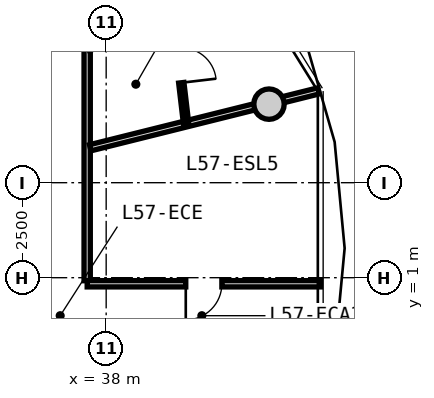
"""IFC4 building model, lengths in metres.
Left out: names, types, materials, properties, quantities, classifications, styles, units other than length and angle.
Written with IfcOpenShell. Run it as: python <this file> out.ifc"""

import sys

from ifc_helpers import new_model, si_unit, direction, frame, frame_2d, origin, origin_2d, place, context, subcontext, project, spatial, rectangle, circle, extrude, source, transform, mapped, element, fill, save


model = new_model("IFC4")
c1 = context("Model", 3, precision=1e-05, world=origin(), true_north=direction((0.0, 1.0)))
c2 = subcontext(c1, "Body", "Model", "MODEL_VIEW")
j1 = project(units=[si_unit("LENGTHUNIT", "METRE"), si_unit("PLANEANGLEUNIT", "RADIAN")], contexts=[c1])
p1 = place(None, origin())
s1 = spatial("IfcSite", under=j1, at=p1, CompositionType="ELEMENT")
p2 = place(p1, origin())
s2 = spatial("IfcBuilding", under=s1, at=p2, CompositionType="ELEMENT")
p3 = place(p2, frame((0.0, 0.0, 183.1)))
s3 = spatial("IfcBuildingStorey", under=s2, at=p3, CompositionType="ELEMENT", Elevation=183.1)
m1 = source(origin(), c2, "Body", "SweptSolid", [
    extrude(circle(Radius=0.4, at=origin_2d()), origin(), (0.0, 0.0, 1.0), 3.05),
])
p4 = place(p3, frame((42.285, 5.567, 0.0), z_axis=(0.0, 0.0, 1.0), x_axis=(1.0, 0.0, 0.0)))
e1 = element("IfcColumn", 1, at=p4, inside=s3, PredefinedType="COLUMN", context=c2, shape_type="MappedRepresentation", body=[
    mapped(m1, transform((0.0, 0.0, 0.0), x_axis=(1.0, 0.0, 0.0), y_axis=(0.0, 1.0, 0.0), z_axis=(0.0, 0.0, 1.0), scale=1.0)),
])
m2 = source(origin(), c2, "Body", "SweptSolid", [
    extrude(rectangle(XDim=6.88, YDim=0.165, at=frame_2d((3.44, 0.0))), origin(), (0.0, 0.0, 1.0), 2.715),
])
p5 = place(p3, frame((37.5, 7.8, 0.0), z_axis=(0.0, 0.0, 1.0), x_axis=(0.0, -1.0, 0.0)))
e2 = element("IfcWall", 2, at=p5, inside=s3, PredefinedType="PARTITIONING", context=c2, shape_type="MappedRepresentation", body=[
    mapped(m2, transform((0.0, 0.0, 0.0), x_axis=(1.0, 0.0, 0.0), y_axis=(0.0, 1.0, 0.0), z_axis=(0.0, 0.0, 1.0), scale=1.0)),
])
m3 = source(origin(), c2, "Body", "SweptSolid", [
    extrude(rectangle(XDim=6.193, YDim=0.165, at=frame_2d((3.096, 0.0))), origin(), (0.0, 0.0, 1.0), 2.265),
])
p6 = place(p3, frame((37.58, 4.419, 0.0), z_axis=(0.0, 0.0, 1.0), x_axis=(0.970309243466, 0.241867674657, 0.0)))
e3 = element("IfcWall", 3, at=p6, inside=s3, PredefinedType="PARTITIONING", context=c2, shape_type="MappedRepresentation", body=[
    mapped(m3, transform((0.0, 0.0, 0.0), x_axis=(1.0, 0.0, 0.0), y_axis=(0.0, 1.0, 0.0), z_axis=(0.0, 0.0, 1.0), scale=1.0)),
])
m4 = source(origin(), c2, "Body", "SweptSolid", [
    extrude(rectangle(XDim=6.139, YDim=0.165, at=frame_2d((3.069, 0.0))), origin(), (0.0, 0.0, 1.0), 2.715),
])
p7 = place(p3, frame((37.5, 0.84, 0.0), z_axis=(0.0, 0.0, 1.0), x_axis=(1.0, 0.0, 0.0)))
e4 = element("IfcWall", 4, at=p7, inside=s3, PredefinedType="PARTITIONING", context=c2, shape_type="MappedRepresentation", body=[
    mapped(m4, transform((0.0, 0.0, 0.0), x_axis=(1.0, 0.0, 0.0), y_axis=(0.0, 1.0, 0.0), z_axis=(0.0, 0.0, 1.0), scale=1.0)),
])
p8 = place(p7, frame((2.594, 0.0, 0.0)))
e5 = element("IfcOpeningElement", 5, at=p8, cuts=e4, PredefinedType="OPENING", context=c2, shape_type="SweptSolid", body=[
    extrude(rectangle(XDim=0.95, YDim=2.1, at=frame_2d((0.475, 1.05))), frame((0.0, 0.093, 0.0), z_axis=(0.0, -1.0, 0.0), x_axis=(1.0, 0.0, 0.0)), (0.0, 0.0, 1.0), 0.185),
])
m5 = source(origin(), c2, "Body", "SweptSolid", [
    extrude(rectangle(XDim=3.101, YDim=0.14, at=frame_2d((1.551, 0.0))), origin(), (0.0, 0.0, 1.0), 2.715),
])
p9 = place(p3, frame((39.742, 8.127, 0.0), z_axis=(0.0, 0.0, 1.0), x_axis=(0.116754457614, -0.993160811061, 0.0)))
e6 = element("IfcWall", 6, at=p9, inside=s3, PredefinedType="PARTITIONING", context=c2, shape_type="MappedRepresentation", body=[
    mapped(m5, transform((0.0, 0.0, 0.0), x_axis=(1.0, 0.0, 0.0), y_axis=(0.0, 1.0, 0.0), z_axis=(0.0, 0.0, 1.0), scale=1.0)),
])
p10 = place(p9, frame((1.09, 0.0, 0.0)))
e7 = element("IfcOpeningElement", 7, at=p10, cuts=e6, PredefinedType="OPENING", context=c2, shape_type="SweptSolid", body=[
    extrude(rectangle(XDim=0.92, YDim=2.1, at=frame_2d((0.46, 1.05))), frame((0.0, 0.08, 0.0), z_axis=(0.0, -1.0, 0.0), x_axis=(1.0, 0.0, 0.0)), (0.0, 0.0, 1.0), 0.16),
])
m6 = source(origin(), c2, "Body", "SweptSolid", [
    extrude(rectangle(XDim=0.95, YDim=2.1, at=frame_2d((0.475, 1.05))), frame((0.0, 0.025, 0.0), z_axis=(0.0, -1.0, 0.0), x_axis=(1.0, 0.0, 0.0)), (0.0, 0.0, 1.0), 0.05),
])
p11 = place(p8, frame((0.95, 0.0, 0.0), z_axis=(0.0, 0.0, 1.0), x_axis=(-1.0, 0.0, 0.0)))
e8 = element("IfcDoor", 8, at=p11, inside=s3, OperationType="SINGLE_SWING_RIGHT", PredefinedType="DOOR", context=c2, shape_type="MappedRepresentation", body=[
    mapped(m6, transform((0.0, 0.0, 0.0), x_axis=(1.0, 0.0, 0.0), y_axis=(0.0, 1.0, 0.0), z_axis=(0.0, 0.0, 1.0), scale=1.0)),
])
fill(e5, e8)
m7 = source(origin(), c2, "Body", "SweptSolid", [
    extrude(rectangle(XDim=0.92, YDim=2.1, at=frame_2d((0.46, 1.05))), frame((0.0, 0.025, 0.0), z_axis=(0.0, -1.0, 0.0), x_axis=(1.0, 0.0, 0.0)), (0.0, 0.0, 1.0), 0.05),
])
p12 = place(p10, origin())
e9 = element("IfcDoor", 9, at=p12, inside=s3, OperationType="SINGLE_SWING_RIGHT", PredefinedType="DOOR", context=c2, shape_type="MappedRepresentation", body=[
    mapped(m7, transform((0.0, 0.0, 0.0), x_axis=(1.0, 0.0, 0.0), y_axis=(0.0, 1.0, 0.0), z_axis=(0.0, 0.0, 1.0), scale=1.0)),
])
fill(e7, e9)
save(model, sys.argv[1])
